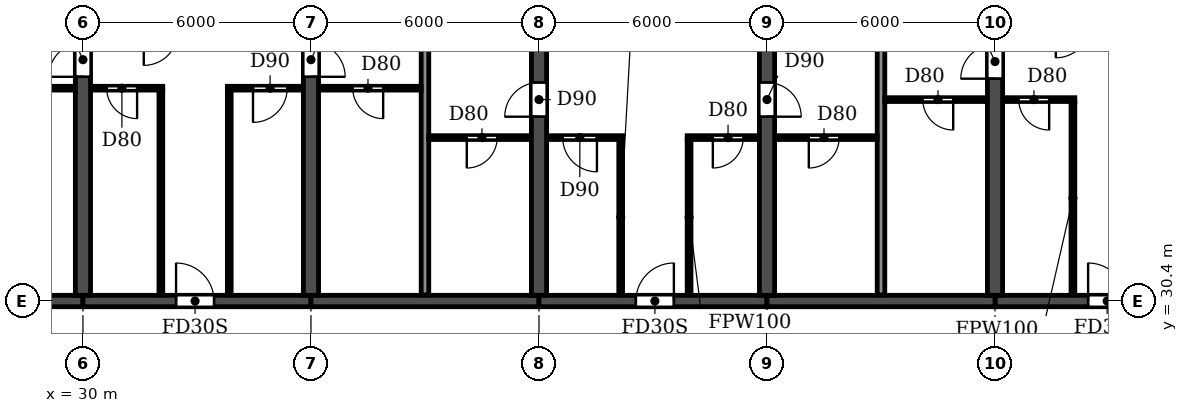
"""IFC4 building model, lengths in metres.
Left out: names, types, materials, properties, quantities, classifications, styles, units other than length and angle.
Written with IfcOpenShell. Run it as: python <this file> out.ifc"""

import sys

from ifc_helpers import new_model, si_unit, direction, frame, frame_2d, origin, place, context, subcontext, project, spatial, rectangle, extrude, element, fill, save


model = new_model("IFC4")
c1 = context("Model", 3, precision=1e-05, world=origin(), true_north=direction((0.0, 1.0)))
c2 = subcontext(c1, "Body", "Model", "MODEL_VIEW")
j1 = project(units=[si_unit("LENGTHUNIT", "METRE"), si_unit("PLANEANGLEUNIT", "RADIAN")], contexts=[c1])
p1 = place(None, origin())
s1 = spatial("IfcSite", under=j1, at=p1, CompositionType="ELEMENT")
p2 = place(p1, origin())
s2 = spatial("IfcBuilding", under=s1, at=p2, CompositionType="ELEMENT")
p3 = place(p2, frame((0.0, 0.0, 49.8)))
s3 = spatial("IfcBuildingStorey", under=s2, at=p3, CompositionType="ELEMENT", Elevation=49.8)
p4 = place(p3, frame((30.0, 30.55, 0.0), z_axis=(0.0, 0.0, 1.0), x_axis=(0.0, 1.0, 0.0)))
e1 = element("IfcWall", 1, at=p4, inside=s3, PredefinedType="SHEAR", context=c2, shape_type="SweptSolid", body=[
    extrude(rectangle(XDim=14.05, YDim=0.4, at=frame_2d((7.025, 0.0))), origin(), (0.0, 0.0, 1.0), 3.0),
])
p5 = place(p4, frame((5.75, 0.0, 0.0)))
e2 = element("IfcOpeningElement", 2, at=p5, cuts=e1, PredefinedType="OPENING", context=c2, shape_type="SweptSolid", body=[
    extrude(rectangle(XDim=0.9, YDim=2.1, at=frame_2d((0.45, 1.05))), frame((0.0, 0.21, 0.0), z_axis=(0.0, -1.0, 0.0), x_axis=(1.0, 0.0, 0.0)), (0.0, 0.0, 1.0), 0.42),
])
p6 = place(p3, frame((36.0, 30.55, 0.0), z_axis=(0.0, 0.0, 1.0), x_axis=(0.0, 1.0, 0.0)))
e3 = element("IfcWall", 3, at=p6, inside=s3, PredefinedType="SHEAR", context=c2, shape_type="SweptSolid", body=[
    extrude(rectangle(XDim=14.05, YDim=0.4, at=frame_2d((7.025, 0.0))), origin(), (0.0, 0.0, 1.0), 3.0),
])
p7 = place(p6, frame((5.75, 0.0, 0.0)))
e4 = element("IfcOpeningElement", 4, at=p7, cuts=e3, PredefinedType="OPENING", context=c2, shape_type="SweptSolid", body=[
    extrude(rectangle(XDim=0.9, YDim=2.1, at=frame_2d((0.45, 1.05))), frame((0.0, 0.21, 0.0), z_axis=(0.0, -1.0, 0.0), x_axis=(1.0, 0.0, 0.0)), (0.0, 0.0, 1.0), 0.42),
])
p8 = place(p3, frame((42.0, 30.55, 0.0), z_axis=(0.0, 0.0, 1.0), x_axis=(0.0, 1.0, 0.0)))
e5 = element("IfcWall", 5, at=p8, inside=s3, PredefinedType="SHEAR", context=c2, shape_type="SweptSolid", body=[
    extrude(rectangle(XDim=14.05, YDim=0.4, at=frame_2d((7.025, 0.0))), origin(), (0.0, 0.0, 1.0), 3.0),
])
p9 = place(p8, frame((4.7, 0.0, 0.0)))
e6 = element("IfcOpeningElement", 6, at=p9, cuts=e5, PredefinedType="OPENING", context=c2, shape_type="SweptSolid", body=[
    extrude(rectangle(XDim=0.9, YDim=2.1, at=frame_2d((0.45, 1.05))), frame((0.0, 0.21, 0.0), z_axis=(0.0, -1.0, 0.0), x_axis=(1.0, 0.0, 0.0)), (0.0, 0.0, 1.0), 0.42),
])
p10 = place(p3, frame((48.0, 30.55, 0.0), z_axis=(0.0, 0.0, 1.0), x_axis=(0.0, 1.0, 0.0)))
e7 = element("IfcWall", 7, at=p10, inside=s3, PredefinedType="SHEAR", context=c2, shape_type="SweptSolid", body=[
    extrude(rectangle(XDim=14.05, YDim=0.4, at=frame_2d((7.025, 0.0))), origin(), (0.0, 0.0, 1.0), 3.0),
])
p11 = place(p10, frame((4.7, 0.0, 0.0)))
e8 = element("IfcOpeningElement", 8, at=p11, cuts=e7, PredefinedType="OPENING", context=c2, shape_type="SweptSolid", body=[
    extrude(rectangle(XDim=0.9, YDim=2.1, at=frame_2d((0.45, 1.05))), frame((0.0, 0.21, 0.0), z_axis=(0.0, -1.0, 0.0), x_axis=(1.0, 0.0, 0.0)), (0.0, 0.0, 1.0), 0.42),
])
p12 = place(p3, frame((54.0, 30.55, 0.0), z_axis=(0.0, 0.0, 1.0), x_axis=(0.0, 1.0, 0.0)))
e9 = element("IfcWall", 9, at=p12, inside=s3, PredefinedType="SHEAR", context=c2, shape_type="SweptSolid", body=[
    extrude(rectangle(XDim=14.05, YDim=0.4, at=frame_2d((7.025, 0.0))), origin(), (0.0, 0.0, 1.0), 3.0),
])
p13 = place(p12, frame((5.7, 0.0, 0.0)))
e10 = element("IfcOpeningElement", 10, at=p13, cuts=e9, PredefinedType="OPENING", context=c2, shape_type="SweptSolid", body=[
    extrude(rectangle(XDim=0.9, YDim=2.1, at=frame_2d((0.45, 1.05))), frame((0.0, 0.21, 0.0), z_axis=(0.0, -1.0, 0.0), x_axis=(1.0, 0.0, 0.0)), (0.0, 0.0, 1.0), 0.42),
])
p14 = place(p3, frame((24.0, 30.4, 0.0), z_axis=(0.0, 0.0, 1.0), x_axis=(1.0, 0.0, 0.0)))
e11 = element("IfcWall", 11, at=p14, inside=s3, PredefinedType="SHEAR", context=c2, shape_type="SweptSolid", body=[
    extrude(rectangle(XDim=6.0, YDim=0.3, at=frame_2d((3.0, 0.0))), origin(), (0.0, 0.0, 1.0), 2.4),
])
p15 = place(p3, frame((30.0, 30.4, 0.0), z_axis=(0.0, 0.0, 1.0), x_axis=(1.0, 0.0, 0.0)))
e12 = element("IfcWall", 12, at=p15, inside=s3, PredefinedType="SHEAR", context=c2, shape_type="SweptSolid", body=[
    extrude(rectangle(XDim=6.0, YDim=0.3, at=frame_2d((3.0, 0.0))), origin(), (0.0, 0.0, 1.0), 2.4),
])
p16 = place(p15, frame((2.45, 0.0, 0.0)))
e13 = element("IfcOpeningElement", 13, at=p16, cuts=e12, PredefinedType="OPENING", context=c2, shape_type="SweptSolid", body=[
    extrude(rectangle(XDim=1.0, YDim=2.1, at=frame_2d((0.5, 1.05))), frame((0.0, 0.16, 0.0), z_axis=(0.0, -1.0, 0.0), x_axis=(1.0, 0.0, 0.0)), (0.0, 0.0, 1.0), 0.32),
])
p17 = place(p3, frame((36.0, 30.4, 0.0), z_axis=(0.0, 0.0, 1.0), x_axis=(1.0, 0.0, 0.0)))
e14 = element("IfcWall", 14, at=p17, inside=s3, PredefinedType="SHEAR", context=c2, shape_type="SweptSolid", body=[
    extrude(rectangle(XDim=6.0, YDim=0.3, at=frame_2d((3.0, 0.0))), origin(), (0.0, 0.0, 1.0), 2.4),
])
p18 = place(p3, frame((42.0, 30.4, 0.0), z_axis=(0.0, 0.0, 1.0), x_axis=(1.0, 0.0, 0.0)))
e15 = element("IfcWall", 15, at=p18, inside=s3, PredefinedType="SHEAR", context=c2, shape_type="SweptSolid", body=[
    extrude(rectangle(XDim=6.0, YDim=0.3, at=frame_2d((3.0, 0.0))), origin(), (0.0, 0.0, 1.0), 2.4),
])
p19 = place(p18, frame((2.55, 0.0, 0.0)))
e16 = element("IfcOpeningElement", 16, at=p19, cuts=e15, PredefinedType="OPENING", context=c2, shape_type="SweptSolid", body=[
    extrude(rectangle(XDim=1.0, YDim=2.1, at=frame_2d((0.5, 1.05))), frame((0.0, 0.16, 0.0), z_axis=(0.0, -1.0, 0.0), x_axis=(1.0, 0.0, 0.0)), (0.0, 0.0, 1.0), 0.32),
])
p20 = place(p3, frame((48.0, 30.4, 0.0), z_axis=(0.0, 0.0, 1.0), x_axis=(1.0, 0.0, 0.0)))
e17 = element("IfcWall", 17, at=p20, inside=s3, PredefinedType="SHEAR", context=c2, shape_type="SweptSolid", body=[
    extrude(rectangle(XDim=6.0, YDim=0.3, at=frame_2d((3.0, 0.0))), origin(), (0.0, 0.0, 1.0), 2.4),
])
p21 = place(p3, frame((54.0, 30.4, 0.0), z_axis=(0.0, 0.0, 1.0), x_axis=(1.0, 0.0, 0.0)))
e18 = element("IfcWall", 18, at=p21, inside=s3, PredefinedType="SHEAR", context=c2, shape_type="SweptSolid", body=[
    extrude(rectangle(XDim=6.0, YDim=0.3, at=frame_2d((3.0, 0.0))), origin(), (0.0, 0.0, 1.0), 2.4),
])
p22 = place(p21, frame((2.45, 0.0, 0.0)))
e19 = element("IfcOpeningElement", 19, at=p22, cuts=e18, PredefinedType="OPENING", context=c2, shape_type="SweptSolid", body=[
    extrude(rectangle(XDim=1.0, YDim=2.1, at=frame_2d((0.5, 1.05))), frame((0.0, 0.16, 0.0), z_axis=(0.0, -1.0, 0.0), x_axis=(1.0, 0.0, 0.0)), (0.0, 0.0, 1.0), 0.32),
])
for number, where, z_axis, x_axis in (
    (20, (39.0, 30.56, 0.0), (0.0, 0.0, 1.0), (0.0, 1.0, 0.0)),
    (21, (51.0, 30.56, 0.0), (0.0, 0.0, 1.0), (0.0, 1.0, 0.0)),
):
    element("IfcWall", number, at=place(p3, frame(where, z_axis=z_axis, x_axis=x_axis)), inside=s3, PredefinedType="PARTITIONING", context=c2, shape_type="SweptSolid", body=[
        extrude(rectangle(XDim=14.18, YDim=0.2, at=frame_2d((7.09, 0.0))), origin(), (0.0, 0.0, 1.0), 3.0),
    ])
p23 = place(p3, frame((39.1, 34.7, 0.0), z_axis=(0.0, 0.0, 1.0), x_axis=(1.0, 0.0, 0.0)))
e22 = element("IfcWall", 22, at=p23, inside=s3, PredefinedType="PARTITIONING", context=c2, shape_type="SweptSolid", body=[
    extrude(rectangle(XDim=2.69, YDim=0.1, at=frame_2d((1.345, 0.0))), origin(), (0.0, 0.0, 1.0), 3.0),
])
p24 = place(p23, frame((1.0, 0.0, 0.0)))
e23 = element("IfcOpeningElement", 23, at=p24, cuts=e22, PredefinedType="OPENING", context=c2, shape_type="SweptSolid", body=[
    extrude(rectangle(XDim=0.8, YDim=2.1, at=frame_2d((0.4, 1.05))), frame((0.0, 0.06, 0.0), z_axis=(0.0, -1.0, 0.0), x_axis=(1.0, 0.0, 0.0)), (0.0, 0.0, 1.0), 0.12),
])
p25 = place(p3, frame((42.21, 34.7, 0.0), z_axis=(0.0, 0.0, 1.0), x_axis=(1.0, 0.0, 0.0)))
e24 = element("IfcWall", 24, at=p25, inside=s3, PredefinedType="PARTITIONING", context=c2, shape_type="SweptSolid", body=[
    extrude(rectangle(XDim=1.99, YDim=0.1, at=frame_2d((0.995, 0.0))), origin(), (0.0, 0.0, 1.0), 3.0),
])
p26 = place(p25, frame((0.415, 0.0, 0.0)))
e25 = element("IfcOpeningElement", 25, at=p26, cuts=e24, PredefinedType="OPENING", context=c2, shape_type="SweptSolid", body=[
    extrude(rectangle(XDim=0.9, YDim=2.1, at=frame_2d((0.45, 1.05))), frame((0.0, 0.06, 0.0), z_axis=(0.0, -1.0, 0.0), x_axis=(1.0, 0.0, 0.0)), (0.0, 0.0, 1.0), 0.12),
])
p27 = place(p3, frame((45.9, 34.7, 0.0), z_axis=(0.0, 0.0, 1.0), x_axis=(1.0, 0.0, 0.0)))
e26 = element("IfcWall", 26, at=p27, inside=s3, PredefinedType="PARTITIONING", context=c2, shape_type="SweptSolid", body=[
    extrude(rectangle(XDim=1.89, YDim=0.1, at=frame_2d((0.945, 0.0))), origin(), (0.0, 0.0, 1.0), 3.0),
])
p28 = place(p27, frame((0.675, 0.0, 0.0)))
e27 = element("IfcOpeningElement", 27, at=p28, cuts=e26, PredefinedType="OPENING", context=c2, shape_type="SweptSolid", body=[
    extrude(rectangle(XDim=0.8, YDim=2.1, at=frame_2d((0.4, 1.05))), frame((0.0, 0.06, 0.0), z_axis=(0.0, -1.0, 0.0), x_axis=(1.0, 0.0, 0.0)), (0.0, 0.0, 1.0), 0.12),
])
p29 = place(p3, frame((48.21, 34.7, 0.0), z_axis=(0.0, 0.0, 1.0), x_axis=(1.0, 0.0, 0.0)))
e28 = element("IfcWall", 28, at=p29, inside=s3, PredefinedType="PARTITIONING", context=c2, shape_type="SweptSolid", body=[
    extrude(rectangle(XDim=2.69, YDim=0.1, at=frame_2d((1.345, 0.0))), origin(), (0.0, 0.0, 1.0), 3.0),
])
p30 = place(p29, frame((0.89, 0.0, 0.0)))
e29 = element("IfcOpeningElement", 29, at=p30, cuts=e28, PredefinedType="OPENING", context=c2, shape_type="SweptSolid", body=[
    extrude(rectangle(XDim=0.8, YDim=2.1, at=frame_2d((0.4, 1.05))), frame((0.0, 0.06, 0.0), z_axis=(0.0, -1.0, 0.0), x_axis=(1.0, 0.0, 0.0)), (0.0, 0.0, 1.0), 0.12),
])
p31 = place(p3, frame((51.1, 35.7, 0.0), z_axis=(0.0, 0.0, 1.0), x_axis=(1.0, 0.0, 0.0)))
e30 = element("IfcWall", 30, at=p31, inside=s3, PredefinedType="PARTITIONING", context=c2, shape_type="SweptSolid", body=[
    extrude(rectangle(XDim=2.69, YDim=0.1, at=frame_2d((1.345, 0.0))), origin(), (0.0, 0.0, 1.0), 3.0),
])
p32 = place(p31, frame((1.0, 0.0, 0.0)))
e31 = element("IfcOpeningElement", 31, at=p32, cuts=e30, PredefinedType="OPENING", context=c2, shape_type="SweptSolid", body=[
    extrude(rectangle(XDim=0.8, YDim=2.1, at=frame_2d((0.4, 1.05))), frame((0.0, 0.06, 0.0), z_axis=(0.0, -1.0, 0.0), x_axis=(1.0, 0.0, 0.0)), (0.0, 0.0, 1.0), 0.12),
])
p33 = place(p3, frame((54.21, 35.7, 0.0), z_axis=(0.0, 0.0, 1.0), x_axis=(1.0, 0.0, 0.0)))
e32 = element("IfcWall", 32, at=p33, inside=s3, PredefinedType="PARTITIONING", context=c2, shape_type="SweptSolid", body=[
    extrude(rectangle(XDim=1.89, YDim=0.1, at=frame_2d((0.945, 0.0))), origin(), (0.0, 0.0, 1.0), 3.0),
])
p34 = place(p33, frame((0.415, 0.0, 0.0)))
e33 = element("IfcOpeningElement", 33, at=p34, cuts=e32, PredefinedType="OPENING", context=c2, shape_type="SweptSolid", body=[
    extrude(rectangle(XDim=0.8, YDim=2.1, at=frame_2d((0.4, 1.05))), frame((0.0, 0.06, 0.0), z_axis=(0.0, -1.0, 0.0), x_axis=(1.0, 0.0, 0.0)), (0.0, 0.0, 1.0), 0.12),
])
p35 = place(p3, frame((27.1, 36.0, 0.0), z_axis=(0.0, 0.0, 1.0), x_axis=(1.0, 0.0, 0.0)))
e34 = element("IfcWall", 34, at=p35, inside=s3, PredefinedType="PARTITIONING", context=c2, shape_type="SweptSolid", body=[
    extrude(rectangle(XDim=2.69, YDim=0.1, at=frame_2d((1.345, 0.0))), origin(), (0.0, 0.0, 1.0), 3.0),
])
p36 = place(p35, frame((1.0, 0.0, 0.0)))
e35 = element("IfcOpeningElement", 35, at=p36, cuts=e34, PredefinedType="OPENING", context=c2, shape_type="SweptSolid", body=[
    extrude(rectangle(XDim=0.8, YDim=2.1, at=frame_2d((0.4, 1.05))), frame((0.0, 0.06, 0.0), z_axis=(0.0, -1.0, 0.0), x_axis=(1.0, 0.0, 0.0)), (0.0, 0.0, 1.0), 0.12),
])
p37 = place(p3, frame((30.21, 36.0, 0.0), z_axis=(0.0, 0.0, 1.0), x_axis=(1.0, 0.0, 0.0)))
e36 = element("IfcWall", 36, at=p37, inside=s3, PredefinedType="PARTITIONING", context=c2, shape_type="SweptSolid", body=[
    extrude(rectangle(XDim=1.89, YDim=0.1, at=frame_2d((0.945, 0.0))), origin(), (0.0, 0.0, 1.0), 3.0),
])
p38 = place(p37, frame((0.415, 0.0, 0.0)))
e37 = element("IfcOpeningElement", 37, at=p38, cuts=e36, PredefinedType="OPENING", context=c2, shape_type="SweptSolid", body=[
    extrude(rectangle(XDim=0.8, YDim=2.1, at=frame_2d((0.4, 1.05))), frame((0.0, 0.06, 0.0), z_axis=(0.0, -1.0, 0.0), x_axis=(1.0, 0.0, 0.0)), (0.0, 0.0, 1.0), 0.12),
])
p39 = place(p3, frame((33.8, 36.0, 0.0), z_axis=(0.0, 0.0, 1.0), x_axis=(1.0, 0.0, 0.0)))
e38 = element("IfcWall", 38, at=p39, inside=s3, PredefinedType="PARTITIONING", context=c2, shape_type="SweptSolid", body=[
    extrude(rectangle(XDim=1.99, YDim=0.1, at=frame_2d((0.995, 0.0))), origin(), (0.0, 0.0, 1.0), 3.0),
])
p40 = place(p39, frame((0.675, 0.0, 0.0)))
e39 = element("IfcOpeningElement", 39, at=p40, cuts=e38, PredefinedType="OPENING", context=c2, shape_type="SweptSolid", body=[
    extrude(rectangle(XDim=0.9, YDim=2.1, at=frame_2d((0.45, 1.05))), frame((0.0, 0.06, 0.0), z_axis=(0.0, -1.0, 0.0), x_axis=(1.0, 0.0, 0.0)), (0.0, 0.0, 1.0), 0.12),
])
p41 = place(p3, frame((36.21, 36.0, 0.0), z_axis=(0.0, 0.0, 1.0), x_axis=(1.0, 0.0, 0.0)))
e40 = element("IfcWall", 40, at=p41, inside=s3, PredefinedType="PARTITIONING", context=c2, shape_type="SweptSolid", body=[
    extrude(rectangle(XDim=2.69, YDim=0.1, at=frame_2d((1.345, 0.0))), origin(), (0.0, 0.0, 1.0), 3.0),
])
p42 = place(p41, frame((0.89, 0.0, 0.0)))
e41 = element("IfcOpeningElement", 41, at=p42, cuts=e40, PredefinedType="OPENING", context=c2, shape_type="SweptSolid", body=[
    extrude(rectangle(XDim=0.8, YDim=2.1, at=frame_2d((0.4, 1.05))), frame((0.0, 0.06, 0.0), z_axis=(0.0, -1.0, 0.0), x_axis=(1.0, 0.0, 0.0)), (0.0, 0.0, 1.0), 0.12),
])
for number, where, z_axis, x_axis in (
    (42, (32.05, 30.56, 0.0), (0.0, 0.0, 1.0), (0.0, 1.0, 0.0)),
    (43, (33.85, 30.56, 0.0), (0.0, 0.0, 1.0), (0.0, 1.0, 0.0)),
):
    element("IfcWall", number, at=place(p3, frame(where, z_axis=z_axis, x_axis=x_axis)), inside=s3, PredefinedType="PARTITIONING", context=c2, shape_type="SweptSolid", body=[
        extrude(rectangle(XDim=5.39, YDim=0.1, at=frame_2d((2.695, 0.0))), origin(), (0.0, 0.0, 1.0), 3.0),
    ])
for number, where, z_axis, x_axis in (
    (44, (44.15, 30.56, 0.0), (0.0, 0.0, 1.0), (0.0, 1.0, 0.0)),
    (45, (45.95, 30.56, 0.0), (0.0, 0.0, 1.0), (0.0, 1.0, 0.0)),
):
    element("IfcWall", number, at=place(p3, frame(where, z_axis=z_axis, x_axis=x_axis)), inside=s3, PredefinedType="PARTITIONING", context=c2, shape_type="SweptSolid", body=[
        extrude(rectangle(XDim=4.09, YDim=0.1, at=frame_2d((2.045, 0.0))), origin(), (0.0, 0.0, 1.0), 3.0),
    ])
p43 = place(p3, frame((56.05, 30.56, 0.0), z_axis=(0.0, 0.0, 1.0), x_axis=(0.0, 1.0, 0.0)))
e46 = element("IfcWall", 46, at=p43, inside=s3, PredefinedType="PARTITIONING", context=c2, shape_type="SweptSolid", body=[
    extrude(rectangle(XDim=5.09, YDim=0.1, at=frame_2d((2.545, 0.0))), origin(), (0.0, 0.0, 1.0), 3.0),
])
p44 = place(p42, frame((0.8, 0.0, 0.0), z_axis=(0.0, 0.0, 1.0), x_axis=(-1.0, 0.0, 0.0)))
e47 = element("IfcDoor", 47, at=p44, inside=s3, OperationType="SINGLE_SWING_LEFT", PredefinedType="DOOR", context=c2, shape_type="SweptSolid", body=[
    extrude(rectangle(XDim=0.8, YDim=2.1, at=frame_2d((0.4, 1.05))), frame((0.0, 0.025, 0.0), z_axis=(0.0, -1.0, 0.0), x_axis=(1.0, 0.0, 0.0)), (0.0, 0.0, 1.0), 0.05),
])
fill(e41, e47)
p45 = place(p5, origin())
e48 = element("IfcDoor", 48, at=p45, inside=s3, OperationType="SINGLE_SWING_LEFT", PredefinedType="DOOR", context=c2, shape_type="SweptSolid", body=[
    extrude(rectangle(XDim=0.9, YDim=2.1, at=frame_2d((0.45, 1.05))), frame((0.0, 0.025, 0.0), z_axis=(0.0, -1.0, 0.0), x_axis=(1.0, 0.0, 0.0)), (0.0, 0.0, 1.0), 0.05),
])
fill(e2, e48)
p46 = place(p38, frame((0.8, 0.0, 0.0), z_axis=(0.0, 0.0, 1.0), x_axis=(-1.0, 0.0, 0.0)))
e49 = element("IfcDoor", 49, at=p46, inside=s3, OperationType="SINGLE_SWING_LEFT", PredefinedType="DOOR", context=c2, shape_type="SweptSolid", body=[
    extrude(rectangle(XDim=0.8, YDim=2.1, at=frame_2d((0.4, 1.05))), frame((0.0, 0.025, 0.0), z_axis=(0.0, -1.0, 0.0), x_axis=(1.0, 0.0, 0.0)), (0.0, 0.0, 1.0), 0.05),
])
fill(e37, e49)
p47 = place(p16, origin())
e50 = element("IfcDoor", 50, at=p47, inside=s3, OperationType="SINGLE_SWING_LEFT", PredefinedType="DOOR", context=c2, shape_type="SweptSolid", body=[
    extrude(rectangle(XDim=1.0, YDim=2.1, at=frame_2d((0.5, 1.05))), frame((0.0, 0.025, 0.0), z_axis=(0.0, -1.0, 0.0), x_axis=(1.0, 0.0, 0.0)), (0.0, 0.0, 1.0), 0.05),
])
fill(e13, e50)
p48 = place(p40, frame((0.9, 0.0, 0.0), z_axis=(0.0, 0.0, 1.0), x_axis=(-1.0, 0.0, 0.0)))
e51 = element("IfcDoor", 51, at=p48, inside=s3, OperationType="SINGLE_SWING_RIGHT", PredefinedType="DOOR", context=c2, shape_type="SweptSolid", body=[
    extrude(rectangle(XDim=0.9, YDim=2.1, at=frame_2d((0.45, 1.05))), frame((0.0, 0.025, 0.0), z_axis=(0.0, -1.0, 0.0), x_axis=(1.0, 0.0, 0.0)), (0.0, 0.0, 1.0), 0.05),
])
fill(e39, e51)
p49 = place(p7, frame((0.9, 0.0, 0.0), z_axis=(0.0, 0.0, 1.0), x_axis=(-1.0, 0.0, 0.0)))
e52 = element("IfcDoor", 52, at=p49, inside=s3, OperationType="SINGLE_SWING_RIGHT", PredefinedType="DOOR", context=c2, shape_type="SweptSolid", body=[
    extrude(rectangle(XDim=0.9, YDim=2.1, at=frame_2d((0.45, 1.05))), frame((0.0, 0.025, 0.0), z_axis=(0.0, -1.0, 0.0), x_axis=(1.0, 0.0, 0.0)), (0.0, 0.0, 1.0), 0.05),
])
fill(e4, e52)
p50 = place(p24, frame((0.8, 0.0, 0.0), z_axis=(0.0, 0.0, 1.0), x_axis=(-1.0, 0.0, 0.0)))
e53 = element("IfcDoor", 53, at=p50, inside=s3, OperationType="SINGLE_SWING_RIGHT", PredefinedType="DOOR", context=c2, shape_type="SweptSolid", body=[
    extrude(rectangle(XDim=0.8, YDim=2.1, at=frame_2d((0.4, 1.05))), frame((0.0, 0.025, 0.0), z_axis=(0.0, -1.0, 0.0), x_axis=(1.0, 0.0, 0.0)), (0.0, 0.0, 1.0), 0.05),
])
fill(e23, e53)
p51 = place(p30, frame((0.8, 0.0, 0.0), z_axis=(0.0, 0.0, 1.0), x_axis=(-1.0, 0.0, 0.0)))
e54 = element("IfcDoor", 54, at=p51, inside=s3, OperationType="SINGLE_SWING_RIGHT", PredefinedType="DOOR", context=c2, shape_type="SweptSolid", body=[
    extrude(rectangle(XDim=0.8, YDim=2.1, at=frame_2d((0.4, 1.05))), frame((0.0, 0.025, 0.0), z_axis=(0.0, -1.0, 0.0), x_axis=(1.0, 0.0, 0.0)), (0.0, 0.0, 1.0), 0.05),
])
fill(e29, e54)
p52 = place(p9, origin())
e55 = element("IfcDoor", 55, at=p52, inside=s3, OperationType="SINGLE_SWING_LEFT", PredefinedType="DOOR", context=c2, shape_type="SweptSolid", body=[
    extrude(rectangle(XDim=0.9, YDim=2.1, at=frame_2d((0.45, 1.05))), frame((0.0, 0.025, 0.0), z_axis=(0.0, -1.0, 0.0), x_axis=(1.0, 0.0, 0.0)), (0.0, 0.0, 1.0), 0.05),
])
fill(e6, e55)
p53 = place(p26, frame((0.9, 0.0, 0.0), z_axis=(0.0, 0.0, 1.0), x_axis=(-1.0, 0.0, 0.0)))
e56 = element("IfcDoor", 56, at=p53, inside=s3, OperationType="SINGLE_SWING_LEFT", PredefinedType="DOOR", context=c2, shape_type="SweptSolid", body=[
    extrude(rectangle(XDim=0.9, YDim=2.1, at=frame_2d((0.45, 1.05))), frame((0.0, 0.025, 0.0), z_axis=(0.0, -1.0, 0.0), x_axis=(1.0, 0.0, 0.0)), (0.0, 0.0, 1.0), 0.05),
])
fill(e25, e56)
p54 = place(p19, origin())
e57 = element("IfcDoor", 57, at=p54, inside=s3, OperationType="SINGLE_SWING_RIGHT", PredefinedType="DOOR", context=c2, shape_type="SweptSolid", body=[
    extrude(rectangle(XDim=1.0, YDim=2.1, at=frame_2d((0.5, 1.05))), frame((0.0, 0.025, 0.0), z_axis=(0.0, -1.0, 0.0), x_axis=(1.0, 0.0, 0.0)), (0.0, 0.0, 1.0), 0.05),
])
fill(e16, e57)
p55 = place(p28, frame((0.8, 0.0, 0.0), z_axis=(0.0, 0.0, 1.0), x_axis=(-1.0, 0.0, 0.0)))
e58 = element("IfcDoor", 58, at=p55, inside=s3, OperationType="SINGLE_SWING_RIGHT", PredefinedType="DOOR", context=c2, shape_type="SweptSolid", body=[
    extrude(rectangle(XDim=0.8, YDim=2.1, at=frame_2d((0.4, 1.05))), frame((0.0, 0.025, 0.0), z_axis=(0.0, -1.0, 0.0), x_axis=(1.0, 0.0, 0.0)), (0.0, 0.0, 1.0), 0.05),
])
fill(e27, e58)
p56 = place(p11, frame((0.9, 0.0, 0.0), z_axis=(0.0, 0.0, 1.0), x_axis=(-1.0, 0.0, 0.0)))
e59 = element("IfcDoor", 59, at=p56, inside=s3, OperationType="SINGLE_SWING_RIGHT", PredefinedType="DOOR", context=c2, shape_type="SweptSolid", body=[
    extrude(rectangle(XDim=0.9, YDim=2.1, at=frame_2d((0.45, 1.05))), frame((0.0, 0.025, 0.0), z_axis=(0.0, -1.0, 0.0), x_axis=(1.0, 0.0, 0.0)), (0.0, 0.0, 1.0), 0.05),
])
fill(e8, e59)
p57 = place(p32, frame((0.8, 0.0, 0.0), z_axis=(0.0, 0.0, 1.0), x_axis=(-1.0, 0.0, 0.0)))
e60 = element("IfcDoor", 60, at=p57, inside=s3, OperationType="SINGLE_SWING_LEFT", PredefinedType="DOOR", context=c2, shape_type="SweptSolid", body=[
    extrude(rectangle(XDim=0.8, YDim=2.1, at=frame_2d((0.4, 1.05))), frame((0.0, 0.025, 0.0), z_axis=(0.0, -1.0, 0.0), x_axis=(1.0, 0.0, 0.0)), (0.0, 0.0, 1.0), 0.05),
])
fill(e31, e60)
p58 = place(p13, origin())
e61 = element("IfcDoor", 61, at=p58, inside=s3, OperationType="SINGLE_SWING_LEFT", PredefinedType="DOOR", context=c2, shape_type="SweptSolid", body=[
    extrude(rectangle(XDim=0.9, YDim=2.1, at=frame_2d((0.45, 1.05))), frame((0.0, 0.025, 0.0), z_axis=(0.0, -1.0, 0.0), x_axis=(1.0, 0.0, 0.0)), (0.0, 0.0, 1.0), 0.05),
])
fill(e10, e61)
p59 = place(p34, frame((0.8, 0.0, 0.0), z_axis=(0.0, 0.0, 1.0), x_axis=(-1.0, 0.0, 0.0)))
e62 = element("IfcDoor", 62, at=p59, inside=s3, OperationType="SINGLE_SWING_LEFT", PredefinedType="DOOR", context=c2, shape_type="SweptSolid", body=[
    extrude(rectangle(XDim=0.8, YDim=2.1, at=frame_2d((0.4, 1.05))), frame((0.0, 0.025, 0.0), z_axis=(0.0, -1.0, 0.0), x_axis=(1.0, 0.0, 0.0)), (0.0, 0.0, 1.0), 0.05),
])
fill(e33, e62)
p60 = place(p22, origin())
e63 = element("IfcDoor", 63, at=p60, inside=s3, OperationType="SINGLE_SWING_LEFT", PredefinedType="DOOR", context=c2, shape_type="SweptSolid", body=[
    extrude(rectangle(XDim=1.0, YDim=2.1, at=frame_2d((0.5, 1.05))), frame((0.0, 0.025, 0.0), z_axis=(0.0, -1.0, 0.0), x_axis=(1.0, 0.0, 0.0)), (0.0, 0.0, 1.0), 0.05),
])
fill(e19, e63)
save(model, sys.argv[1])
